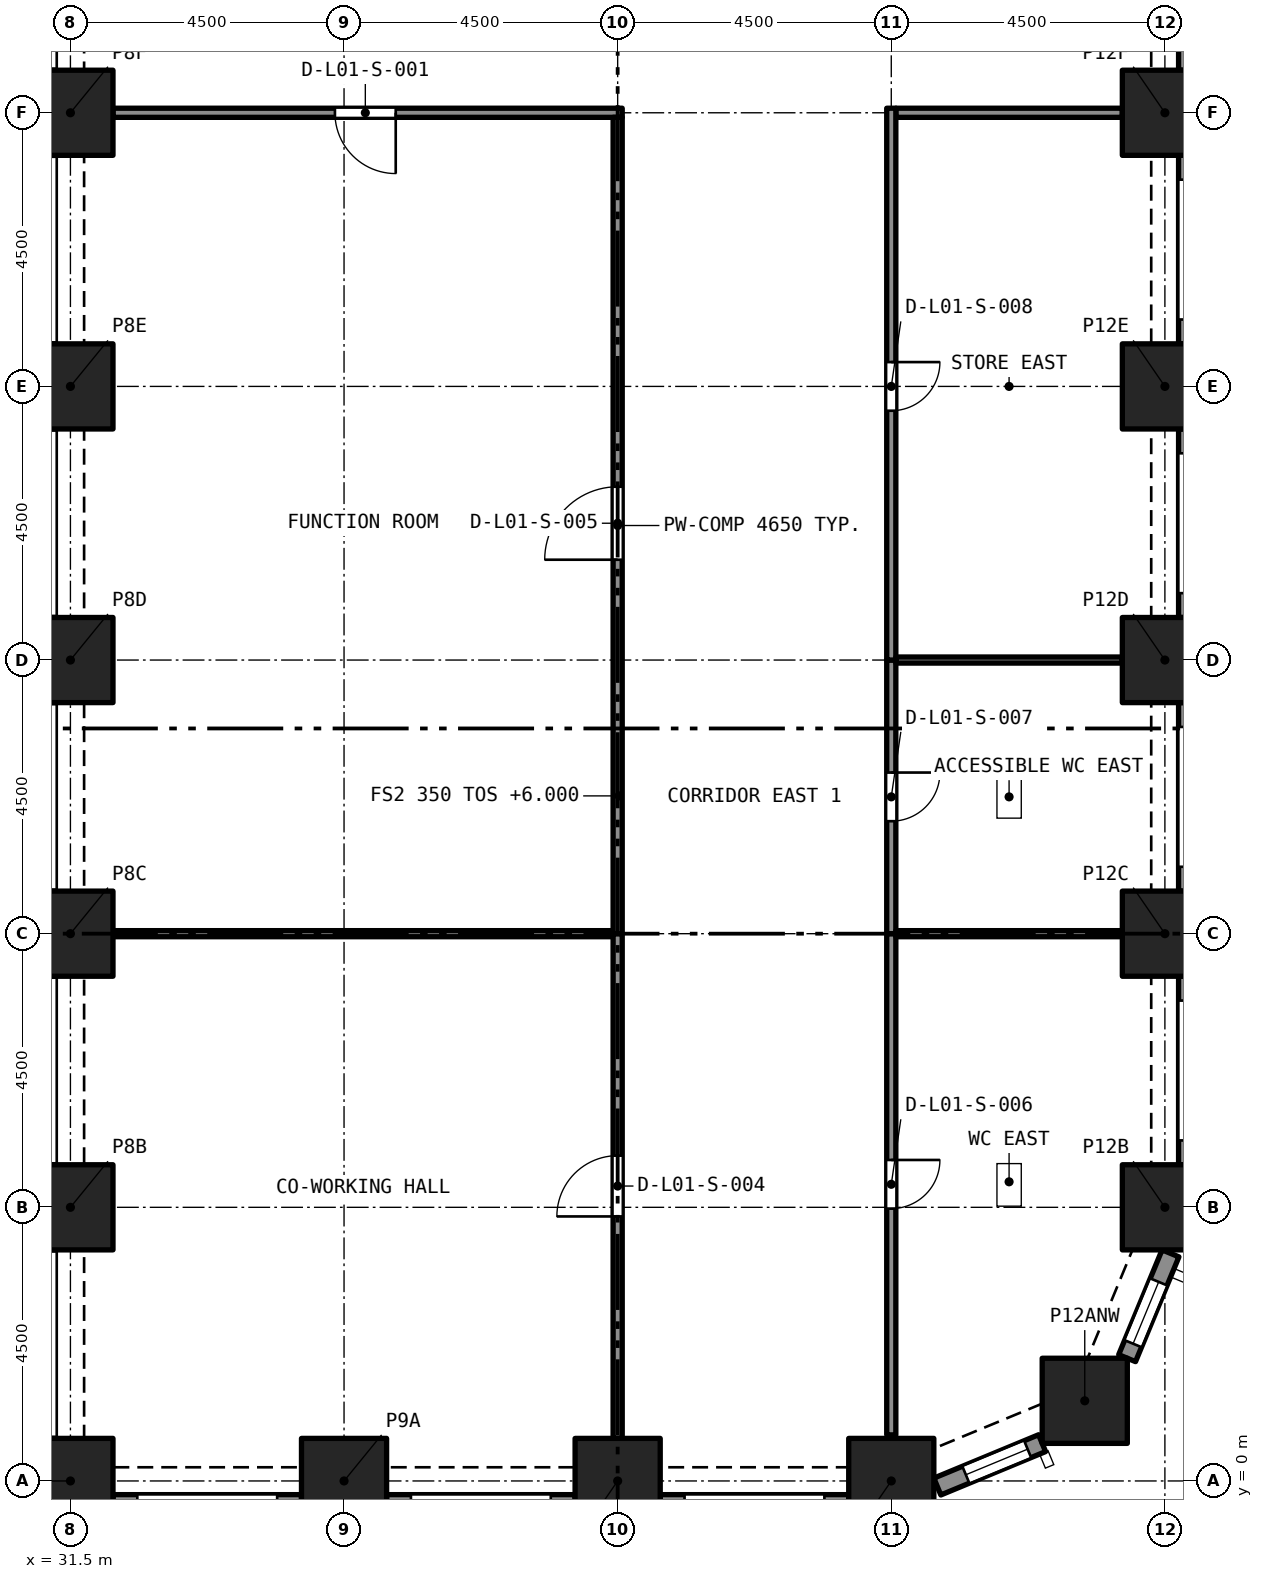
"""IFC4 building model, lengths in metres.
Left out: names, types, materials, properties, quantities, classifications, styles, units other than length and angle.
Written with IfcOpenShell. Run it as: python <this file> out.ifc"""

import sys

from ifc_helpers import new_model, si_unit, direction, frame, frame_2d, origin, origin_2d, place, context, subcontext, project, spatial, rectangle, extrude, element, fill, save


model = new_model("IFC4")
c1 = context("Model", 3, precision=1e-05, world=origin(), true_north=direction((0.0, 1.0)))
c2 = subcontext(c1, "Body", "Model", "MODEL_VIEW")
j1 = project(units=[si_unit("LENGTHUNIT", "METRE"), si_unit("PLANEANGLEUNIT", "RADIAN")], contexts=[c1])
p1 = place(None, origin())
s1 = spatial("IfcSite", under=j1, at=p1, CompositionType="ELEMENT")
p2 = place(p1, origin())
s2 = spatial("IfcBuilding", under=s1, at=p2, CompositionType="ELEMENT")
p3 = place(p2, frame((0.0, 0.0, 6.0)))
s3 = spatial("IfcBuildingStorey", under=s2, at=p3, CompositionType="ELEMENT", Elevation=6.0)
for number, where, z_axis, x_axis in (
    (1, (31.5, 0.0, 0.0), (0.0, 0.0, 1.0), (1.0, 0.0, 0.0)),
    (2, (36.0, 0.0, 0.0), (0.0, 0.0, 1.0), (1.0, 0.0, 0.0)),
    (3, (40.5, 0.0, 0.0), (0.0, 0.0, 1.0), (1.0, 0.0, 0.0)),
    (4, (45.0, 0.0, 0.0), (0.0, 0.0, 1.0), (1.0, 0.0, 0.0)),
    (5, (48.182, 1.318, 0.0), (0.0, 0.0, 1.0), (1.0, 0.0, 0.0)),
    (6, (31.5, 4.5, 0.0), (0.0, 0.0, 1.0), (1.0, 0.0, 0.0)),
    (7, (49.5, 4.5, 0.0), (0.0, 0.0, 1.0), (1.0, 0.0, 0.0)),
    (8, (31.5, 9.0, 0.0), (0.0, 0.0, 1.0), (1.0, 0.0, 0.0)),
    (9, (49.5, 9.0, 0.0), (0.0, 0.0, 1.0), (1.0, 0.0, 0.0)),
    (10, (31.5, 13.5, 0.0), (0.0, 0.0, 1.0), (1.0, 0.0, 0.0)),
    (11, (49.5, 13.5, 0.0), (0.0, 0.0, 1.0), (1.0, 0.0, 0.0)),
    (12, (31.5, 18.0, 0.0), (0.0, 0.0, 1.0), (1.0, 0.0, 0.0)),
    (13, (49.5, 18.0, 0.0), (0.0, 0.0, 1.0), (1.0, 0.0, 0.0)),
    (14, (31.5, 22.5, 0.0), (0.0, 0.0, 1.0), (1.0, 0.0, 0.0)),
    (15, (49.5, 22.5, 0.0), (0.0, 0.0, 1.0), (1.0, 0.0, 0.0)),
):
    element("IfcColumn", number, at=place(p3, frame(where, z_axis=z_axis, x_axis=x_axis)), inside=s3, PredefinedType="COLUMN", context=c2, shape_type="SweptSolid", body=[
        extrude(rectangle(XDim=1.4, YDim=1.4, at=origin_2d()), origin(), (0.0, 0.0, 1.0), 5.0),
    ])
p4 = place(p3, frame((35.3, -0.375, 0.0), z_axis=(0.0, 0.0, 1.0), x_axis=(-1.0, 0.0, 0.0)))
e16 = element("IfcWall", 16, at=p4, inside=s3, PredefinedType="SOLIDWALL", context=c2, shape_type="SweptSolid", body=[
    extrude(rectangle(XDim=3.1, YDim=0.3, at=frame_2d((1.55, 0.0))), origin(), (0.0, 0.0, 1.0), 5.0),
])
p5 = place(p4, frame((0.4, 0.0, 0.45)))
e17 = element("IfcOpeningElement", 17, at=p5, cuts=e16, PredefinedType="OPENING", context=c2, shape_type="SweptSolid", body=[
    extrude(rectangle(XDim=2.3, YDim=3.3, at=frame_2d((1.15, 1.65))), frame((0.0, 0.16, 0.0), z_axis=(0.0, -1.0, 0.0), x_axis=(1.0, 0.0, 0.0)), (0.0, 0.0, 1.0), 0.32),
])
p6 = place(p3, frame((39.8, -0.375, 0.0), z_axis=(0.0, 0.0, 1.0), x_axis=(-1.0, 0.0, 0.0)))
e18 = element("IfcWall", 18, at=p6, inside=s3, PredefinedType="SOLIDWALL", context=c2, shape_type="SweptSolid", body=[
    extrude(rectangle(XDim=3.1, YDim=0.3, at=frame_2d((1.55, 0.0))), origin(), (0.0, 0.0, 1.0), 5.0),
])
p7 = place(p6, frame((0.4, 0.0, 0.45)))
e19 = element("IfcOpeningElement", 19, at=p7, cuts=e18, PredefinedType="OPENING", context=c2, shape_type="SweptSolid", body=[
    extrude(rectangle(XDim=2.3, YDim=3.3, at=frame_2d((1.15, 1.65))), frame((0.0, 0.16, 0.0), z_axis=(0.0, -1.0, 0.0), x_axis=(1.0, 0.0, 0.0)), (0.0, 0.0, 1.0), 0.32),
])
p8 = place(p3, frame((44.3, -0.375, 0.0), z_axis=(0.0, 0.0, 1.0), x_axis=(-1.0, 0.0, 0.0)))
e20 = element("IfcWall", 20, at=p8, inside=s3, PredefinedType="SOLIDWALL", context=c2, shape_type="SweptSolid", body=[
    extrude(rectangle(XDim=3.1, YDim=0.3, at=frame_2d((1.55, 0.0))), origin(), (0.0, 0.0, 1.0), 5.0),
])
p9 = place(p8, frame((0.4, 0.0, 0.45)))
e21 = element("IfcOpeningElement", 21, at=p9, cuts=e20, PredefinedType="OPENING", context=c2, shape_type="SweptSolid", body=[
    extrude(rectangle(XDim=2.3, YDim=3.3, at=frame_2d((1.15, 1.65))), frame((0.0, 0.16, 0.0), z_axis=(0.0, -1.0, 0.0), x_axis=(1.0, 0.0, 0.0)), (0.0, 0.0, 1.0), 0.32),
])
p10 = place(p3, frame((47.48, 0.622, 0.0), z_axis=(0.0, 0.0, 1.0), x_axis=(-0.923903565336, -0.38262540684, 0.0)))
e22 = element("IfcWall", 22, at=p10, inside=s3, PredefinedType="SOLIDWALL", context=c2, shape_type="SweptSolid", body=[
    extrude(rectangle(XDim=1.865, YDim=0.3, at=frame_2d((0.933, 0.0))), origin(), (0.0, 0.0, 1.0), 5.0),
])
p11 = place(p10, frame((0.258, 0.0, 0.45)))
e23 = element("IfcOpeningElement", 23, at=p11, cuts=e22, PredefinedType="OPENING", context=c2, shape_type="SweptSolid", body=[
    extrude(rectangle(XDim=1.1, YDim=3.3, at=frame_2d((0.55, 1.65))), frame((0.0, 0.16, 0.0), z_axis=(0.0, -1.0, 0.0), x_axis=(1.0, 0.0, 0.0)), (0.0, 0.0, 1.0), 0.32),
])
p12 = place(p3, frame((49.592, 3.743, 0.0), z_axis=(0.0, 0.0, 1.0), x_axis=(-0.382737135771, -0.923857286003, 0.0)))
e24 = element("IfcWall", 24, at=p12, inside=s3, PredefinedType="SOLIDWALL", context=c2, shape_type="SweptSolid", body=[
    extrude(rectangle(XDim=1.865, YDim=0.3, at=frame_2d((0.933, 0.0))), origin(), (0.0, 0.0, 1.0), 5.0),
])
p13 = place(p12, frame((0.508, 0.0, 0.45)))
e25 = element("IfcOpeningElement", 25, at=p13, cuts=e24, PredefinedType="OPENING", context=c2, shape_type="SweptSolid", body=[
    extrude(rectangle(XDim=1.1, YDim=3.3, at=frame_2d((0.55, 1.65))), frame((0.0, 0.16, 0.0), z_axis=(0.0, -1.0, 0.0), x_axis=(1.0, 0.0, 0.0)), (0.0, 0.0, 1.0), 0.32),
])
p14 = place(p3, frame((49.875, 8.3, 0.0), z_axis=(0.0, 0.0, 1.0), x_axis=(0.0, -1.0, 0.0)))
e26 = element("IfcWall", 26, at=p14, inside=s3, PredefinedType="SOLIDWALL", context=c2, shape_type="SweptSolid", body=[
    extrude(rectangle(XDim=3.1, YDim=0.3, at=frame_2d((1.55, 0.0))), origin(), (0.0, 0.0, 1.0), 5.0),
])
p15 = place(p14, frame((0.4, 0.0, 0.45)))
e27 = element("IfcOpeningElement", 27, at=p15, cuts=e26, PredefinedType="OPENING", context=c2, shape_type="SweptSolid", body=[
    extrude(rectangle(XDim=2.3, YDim=3.3, at=frame_2d((1.15, 1.65))), frame((0.0, 0.16, 0.0), z_axis=(0.0, -1.0, 0.0), x_axis=(1.0, 0.0, 0.0)), (0.0, 0.0, 1.0), 0.32),
])
p16 = place(p3, frame((49.875, 12.8, 0.0), z_axis=(0.0, 0.0, 1.0), x_axis=(0.0, -1.0, 0.0)))
e28 = element("IfcWall", 28, at=p16, inside=s3, PredefinedType="SOLIDWALL", context=c2, shape_type="SweptSolid", body=[
    extrude(rectangle(XDim=3.1, YDim=0.3, at=frame_2d((1.55, 0.0))), origin(), (0.0, 0.0, 1.0), 5.0),
])
p17 = place(p16, frame((0.4, 0.0, 0.45)))
e29 = element("IfcOpeningElement", 29, at=p17, cuts=e28, PredefinedType="OPENING", context=c2, shape_type="SweptSolid", body=[
    extrude(rectangle(XDim=2.3, YDim=3.3, at=frame_2d((1.15, 1.65))), frame((0.0, 0.16, 0.0), z_axis=(0.0, -1.0, 0.0), x_axis=(1.0, 0.0, 0.0)), (0.0, 0.0, 1.0), 0.32),
])
p18 = place(p3, frame((49.875, 17.3, 0.0), z_axis=(0.0, 0.0, 1.0), x_axis=(0.0, -1.0, 0.0)))
e30 = element("IfcWall", 30, at=p18, inside=s3, PredefinedType="SOLIDWALL", context=c2, shape_type="SweptSolid", body=[
    extrude(rectangle(XDim=3.1, YDim=0.3, at=frame_2d((1.55, 0.0))), origin(), (0.0, 0.0, 1.0), 5.0),
])
p19 = place(p18, frame((0.4, 0.0, 0.45)))
e31 = element("IfcOpeningElement", 31, at=p19, cuts=e30, PredefinedType="OPENING", context=c2, shape_type="SweptSolid", body=[
    extrude(rectangle(XDim=2.3, YDim=3.3, at=frame_2d((1.15, 1.65))), frame((0.0, 0.16, 0.0), z_axis=(0.0, -1.0, 0.0), x_axis=(1.0, 0.0, 0.0)), (0.0, 0.0, 1.0), 0.32),
])
p20 = place(p3, frame((49.875, 21.8, 0.0), z_axis=(0.0, 0.0, 1.0), x_axis=(0.0, -1.0, 0.0)))
e32 = element("IfcWall", 32, at=p20, inside=s3, PredefinedType="SOLIDWALL", context=c2, shape_type="SweptSolid", body=[
    extrude(rectangle(XDim=3.1, YDim=0.3, at=frame_2d((1.55, 0.0))), origin(), (0.0, 0.0, 1.0), 5.0),
])
p21 = place(p20, frame((0.4, 0.0, 0.45)))
e33 = element("IfcOpeningElement", 33, at=p21, cuts=e32, PredefinedType="OPENING", context=c2, shape_type="SweptSolid", body=[
    extrude(rectangle(XDim=2.3, YDim=3.3, at=frame_2d((1.15, 1.65))), frame((0.0, 0.16, 0.0), z_axis=(0.0, -1.0, 0.0), x_axis=(1.0, 0.0, 0.0)), (0.0, 0.0, 1.0), 0.32),
])
p22 = place(p3, frame((49.875, 26.3, 0.0), z_axis=(0.0, 0.0, 1.0), x_axis=(0.0, -1.0, 0.0)))
e34 = element("IfcWall", 34, at=p22, inside=s3, PredefinedType="SOLIDWALL", context=c2, shape_type="SweptSolid", body=[
    extrude(rectangle(XDim=3.1, YDim=0.3, at=frame_2d((1.55, 0.0))), origin(), (0.0, 0.0, 1.0), 5.0),
])
p23 = place(p22, frame((0.4, 0.0, 0.45)))
e35 = element("IfcOpeningElement", 35, at=p23, cuts=e34, PredefinedType="OPENING", context=c2, shape_type="SweptSolid", body=[
    extrude(rectangle(XDim=2.3, YDim=3.3, at=frame_2d((1.15, 1.65))), frame((0.0, 0.16, 0.0), z_axis=(0.0, -1.0, 0.0), x_axis=(1.0, 0.0, 0.0)), (0.0, 0.0, 1.0), 0.32),
])
p24 = place(p3, frame((40.575, 22.5, 0.0), z_axis=(0.0, 0.0, 1.0), x_axis=(-1.0, 0.0, 0.0)))
e36 = element("IfcWall", 36, at=p24, inside=s3, PredefinedType="PARTITIONING", context=c2, shape_type="SweptSolid", body=[
    extrude(rectangle(XDim=8.375, YDim=0.15, at=frame_2d((4.188, 0.0))), origin(), (0.0, 0.0, 1.0), 4.65),
])
p25 = place(p24, frame((3.725, 0.0, 0.0)))
e37 = element("IfcOpeningElement", 37, at=p25, cuts=e36, PredefinedType="OPENING", context=c2, shape_type="SweptSolid", body=[
    extrude(rectangle(XDim=1.0, YDim=2.1, at=frame_2d((0.5, 1.05))), frame((0.0, 0.085, 0.0), z_axis=(0.0, -1.0, 0.0), x_axis=(1.0, 0.0, 0.0)), (0.0, 0.0, 1.0), 0.17),
])
p26 = place(p3, frame((45.075, 22.5, 0.0), z_axis=(0.0, 0.0, 1.0), x_axis=(1.0, 0.0, 0.0)))
e38 = element("IfcWall", 38, at=p26, inside=s3, PredefinedType="PARTITIONING", context=c2, shape_type="SweptSolid", body=[
    extrude(rectangle(XDim=3.725, YDim=0.15, at=frame_2d((1.863, 0.0))), origin(), (0.0, 0.0, 1.0), 4.65),
])
p27 = place(p3, frame((32.2, 9.0, 0.0), z_axis=(0.0, 0.0, 1.0), x_axis=(1.0, 0.0, 0.0)))
e39 = element("IfcWall", 39, at=p27, inside=s3, PredefinedType="PARTITIONING", context=c2, shape_type="SweptSolid", body=[
    extrude(rectangle(XDim=8.225, YDim=0.1, at=frame_2d((4.113, 0.0))), origin(), (0.0, 0.0, 1.0), 4.65),
])
p28 = place(p3, frame((40.5, 0.7, 0.0), z_axis=(0.0, 0.0, 1.0), x_axis=(0.0, 1.0, 0.0)))
e40 = element("IfcWall", 40, at=p28, inside=s3, PredefinedType="PARTITIONING", context=c2, shape_type="SweptSolid", body=[
    extrude(rectangle(XDim=8.3, YDim=0.15, at=frame_2d((4.15, 0.0))), origin(), (0.0, 0.0, 1.0), 4.65),
])
p29 = place(p28, frame((3.65, 0.0, 0.0)))
e41 = element("IfcOpeningElement", 41, at=p29, cuts=e40, PredefinedType="OPENING", context=c2, shape_type="SweptSolid", body=[
    extrude(rectangle(XDim=1.0, YDim=2.1, at=frame_2d((0.5, 1.05))), frame((0.0, 0.085, 0.0), z_axis=(0.0, -1.0, 0.0), x_axis=(1.0, 0.0, 0.0)), (0.0, 0.0, 1.0), 0.17),
])
p30 = place(p3, frame((40.5, 9.0, 0.0), z_axis=(0.0, 0.0, 1.0), x_axis=(0.0, 1.0, 0.0)))
e42 = element("IfcWall", 42, at=p30, inside=s3, PredefinedType="PARTITIONING", context=c2, shape_type="SweptSolid", body=[
    extrude(rectangle(XDim=13.425, YDim=0.15, at=frame_2d((6.712, 0.0))), origin(), (0.0, 0.0, 1.0), 4.65),
])
p31 = place(p30, frame((6.15, 0.0, 0.0)))
e43 = element("IfcOpeningElement", 43, at=p31, cuts=e42, PredefinedType="OPENING", context=c2, shape_type="SweptSolid", body=[
    extrude(rectangle(XDim=1.2, YDim=2.1, at=frame_2d((0.6, 1.05))), frame((0.0, 0.085, 0.0), z_axis=(0.0, -1.0, 0.0), x_axis=(1.0, 0.0, 0.0)), (0.0, 0.0, 1.0), 0.17),
])
p32 = place(p3, frame((45.0, 9.0, 0.0), z_axis=(0.0, 0.0, 1.0), x_axis=(0.0, -1.0, 0.0)))
e44 = element("IfcWall", 44, at=p32, inside=s3, PredefinedType="PARTITIONING", context=c2, shape_type="SweptSolid", body=[
    extrude(rectangle(XDim=8.242, YDim=0.15, at=frame_2d((4.121, 0.0))), origin(), (0.0, 0.0, 1.0), 4.65),
])
p33 = place(p32, frame((3.721, 0.0, 0.0)))
e45 = element("IfcOpeningElement", 45, at=p33, cuts=e44, PredefinedType="OPENING", context=c2, shape_type="SweptSolid", body=[
    extrude(rectangle(XDim=0.8, YDim=2.1, at=frame_2d((0.4, 1.05))), frame((0.0, 0.085, 0.0), z_axis=(0.0, -1.0, 0.0), x_axis=(1.0, 0.0, 0.0)), (0.0, 0.0, 1.0), 0.17),
])
p34 = place(p3, frame((45.0, 13.5, 0.0), z_axis=(0.0, 0.0, 1.0), x_axis=(0.0, -1.0, 0.0)))
e46 = element("IfcWall", 46, at=p34, inside=s3, PredefinedType="PARTITIONING", context=c2, shape_type="SweptSolid", body=[
    extrude(rectangle(XDim=4.5, YDim=0.15, at=frame_2d((2.25, 0.0))), origin(), (0.0, 0.0, 1.0), 4.65),
])
p35 = place(p34, frame((1.85, 0.0, 0.0)))
e47 = element("IfcOpeningElement", 47, at=p35, cuts=e46, PredefinedType="OPENING", context=c2, shape_type="SweptSolid", body=[
    extrude(rectangle(XDim=0.8, YDim=2.1, at=frame_2d((0.4, 1.05))), frame((0.0, 0.085, 0.0), z_axis=(0.0, -1.0, 0.0), x_axis=(1.0, 0.0, 0.0)), (0.0, 0.0, 1.0), 0.17),
])
p36 = place(p3, frame((45.0, 22.575, 0.0), z_axis=(0.0, 0.0, 1.0), x_axis=(0.0, -1.0, 0.0)))
e48 = element("IfcWall", 48, at=p36, inside=s3, PredefinedType="PARTITIONING", context=c2, shape_type="SweptSolid", body=[
    extrude(rectangle(XDim=9.075, YDim=0.15, at=frame_2d((4.538, 0.0))), origin(), (0.0, 0.0, 1.0), 4.65),
])
p37 = place(p36, frame((4.175, 0.0, 0.0)))
e49 = element("IfcOpeningElement", 49, at=p37, cuts=e48, PredefinedType="OPENING", context=c2, shape_type="SweptSolid", body=[
    extrude(rectangle(XDim=0.8, YDim=2.1, at=frame_2d((0.4, 1.05))), frame((0.0, 0.085, 0.0), z_axis=(0.0, -1.0, 0.0), x_axis=(1.0, 0.0, 0.0)), (0.0, 0.0, 1.0), 0.17),
])
for number, where, z_axis, x_axis in (
    (50, (45.075, 9.0, 0.0), (0.0, 0.0, 1.0), (1.0, 0.0, 0.0)),
    (51, (45.075, 13.5, 0.0), (0.0, 0.0, 1.0), (1.0, 0.0, 0.0)),
):
    element("IfcWall", number, at=place(p3, frame(where, z_axis=z_axis, x_axis=x_axis)), inside=s3, PredefinedType="PARTITIONING", context=c2, shape_type="SweptSolid", body=[
        extrude(rectangle(XDim=3.725, YDim=0.1, at=frame_2d((1.863, 0.0))), origin(), (0.0, 0.0, 1.0), 4.65),
    ])
p38 = place(p11, origin())
e52 = element("IfcWindow", 52, at=p38, inside=s3, PartitioningType="SINGLE_PANEL", PredefinedType="WINDOW", context=c2, shape_type="SweptSolid", body=[
    extrude(rectangle(XDim=1.1, YDim=3.3, at=frame_2d((0.55, 1.65))), frame((0.0, 0.03, 0.0), z_axis=(0.0, -1.0, 0.0), x_axis=(1.0, 0.0, 0.0)), (0.0, 0.0, 1.0), 0.06),
])
fill(e23, e52)
p39 = place(p13, origin())
e53 = element("IfcWindow", 53, at=p39, inside=s3, PartitioningType="SINGLE_PANEL", PredefinedType="WINDOW", context=c2, shape_type="SweptSolid", body=[
    extrude(rectangle(XDim=1.1, YDim=3.3, at=frame_2d((0.55, 1.65))), frame((0.0, 0.03, 0.0), z_axis=(0.0, -1.0, 0.0), x_axis=(1.0, 0.0, 0.0)), (0.0, 0.0, 1.0), 0.06),
])
fill(e25, e53)
p40 = place(p25, origin())
e54 = element("IfcDoor", 54, at=p40, inside=s3, OperationType="SINGLE_SWING_RIGHT", PredefinedType="DOOR", context=c2, shape_type="SweptSolid", body=[
    extrude(rectangle(XDim=1.0, YDim=2.1, at=frame_2d((0.5, 1.05))), frame((0.0, 0.025, 0.0), z_axis=(0.0, -1.0, 0.0), x_axis=(1.0, 0.0, 0.0)), (0.0, 0.0, 1.0), 0.05),
])
fill(e37, e54)
p41 = place(p29, origin())
e55 = element("IfcDoor", 55, at=p41, inside=s3, OperationType="SINGLE_SWING_RIGHT", PredefinedType="DOOR", context=c2, shape_type="SweptSolid", body=[
    extrude(rectangle(XDim=1.0, YDim=2.1, at=frame_2d((0.5, 1.05))), frame((0.0, 0.025, 0.0), z_axis=(0.0, -1.0, 0.0), x_axis=(1.0, 0.0, 0.0)), (0.0, 0.0, 1.0), 0.05),
])
fill(e41, e55)
p42 = place(p31, origin())
e56 = element("IfcDoor", 56, at=p42, inside=s3, OperationType="SINGLE_SWING_RIGHT", PredefinedType="DOOR", context=c2, shape_type="SweptSolid", body=[
    extrude(rectangle(XDim=1.2, YDim=2.1, at=frame_2d((0.6, 1.05))), frame((0.0, 0.025, 0.0), z_axis=(0.0, -1.0, 0.0), x_axis=(1.0, 0.0, 0.0)), (0.0, 0.0, 1.0), 0.05),
])
fill(e43, e56)
p43 = place(p33, origin())
e57 = element("IfcDoor", 57, at=p43, inside=s3, OperationType="SINGLE_SWING_RIGHT", PredefinedType="DOOR", context=c2, shape_type="SweptSolid", body=[
    extrude(rectangle(XDim=0.8, YDim=2.1, at=frame_2d((0.4, 1.05))), frame((0.0, 0.025, 0.0), z_axis=(0.0, -1.0, 0.0), x_axis=(1.0, 0.0, 0.0)), (0.0, 0.0, 1.0), 0.05),
])
fill(e45, e57)
p44 = place(p35, origin())
e58 = element("IfcDoor", 58, at=p44, inside=s3, OperationType="SINGLE_SWING_RIGHT", PredefinedType="DOOR", context=c2, shape_type="SweptSolid", body=[
    extrude(rectangle(XDim=0.8, YDim=2.1, at=frame_2d((0.4, 1.05))), frame((0.0, 0.025, 0.0), z_axis=(0.0, -1.0, 0.0), x_axis=(1.0, 0.0, 0.0)), (0.0, 0.0, 1.0), 0.05),
])
fill(e47, e58)
p45 = place(p37, origin())
e59 = element("IfcDoor", 59, at=p45, inside=s3, OperationType="SINGLE_SWING_RIGHT", PredefinedType="DOOR", context=c2, shape_type="SweptSolid", body=[
    extrude(rectangle(XDim=0.8, YDim=2.1, at=frame_2d((0.4, 1.05))), frame((0.0, 0.025, 0.0), z_axis=(0.0, -1.0, 0.0), x_axis=(1.0, 0.0, 0.0)), (0.0, 0.0, 1.0), 0.05),
])
fill(e49, e59)
save(model, sys.argv[1])
